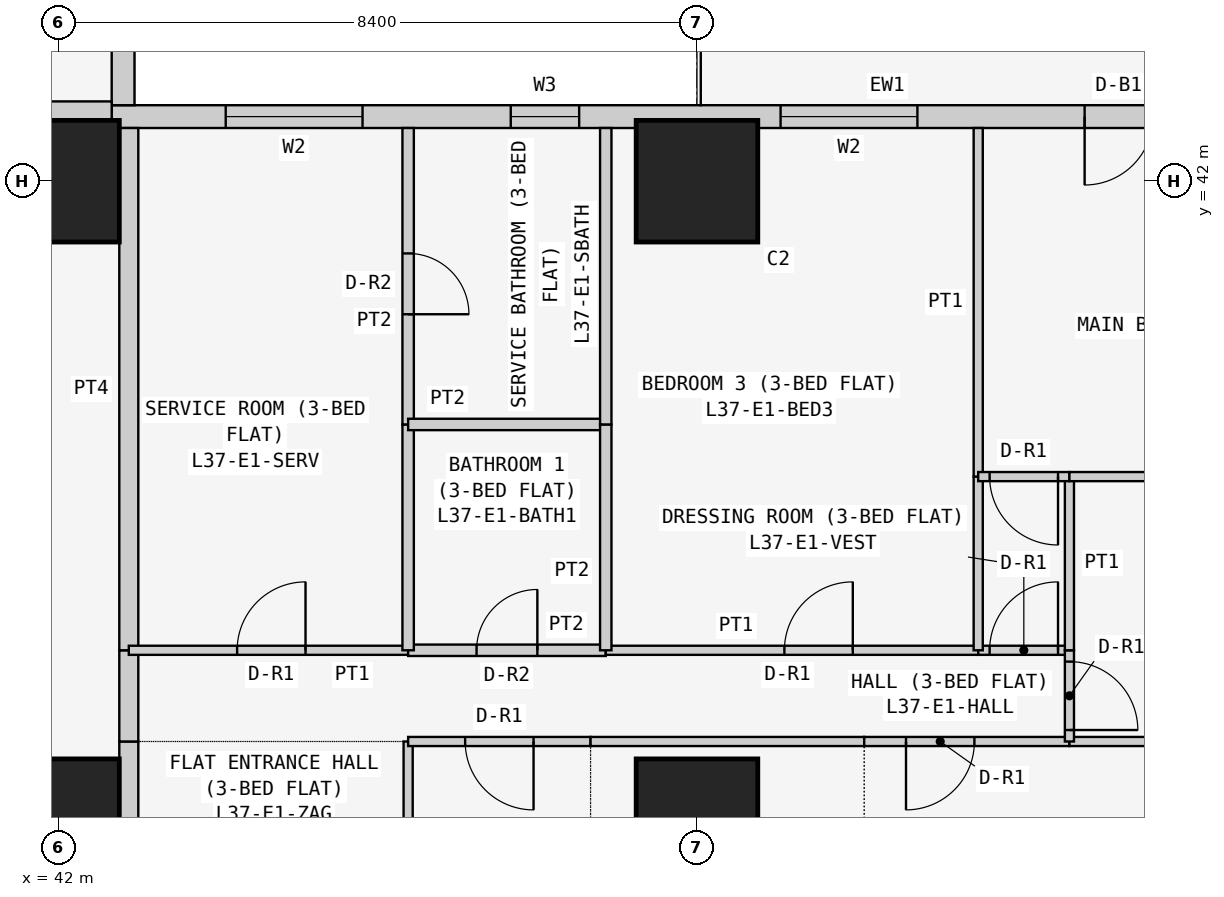
"""IFC4 building model, lengths in metres.
Left out: names, types, materials, properties, quantities, classifications, styles, units other than length and angle.
Written with IfcOpenShell. Run it as: python <this file> out.ifc"""

import sys

from ifc_helpers import new_model, si_unit, direction, frame, frame_2d, origin, origin_2d, place, context, subcontext, project, spatial, rectangle, extrude, element, fill, save


model = new_model("IFC4")
c1 = context("Model", 3, precision=1e-05, world=origin(), true_north=direction((0.0, 1.0)))
c2 = subcontext(c1, "Body", "Model", "MODEL_VIEW")
j1 = project(units=[si_unit("LENGTHUNIT", "METRE"), si_unit("PLANEANGLEUNIT", "RADIAN")], contexts=[c1])
p1 = place(None, origin())
s1 = spatial("IfcSite", under=j1, at=p1, CompositionType="ELEMENT")
p2 = place(p1, origin())
s2 = spatial("IfcBuilding", under=s1, at=p2, CompositionType="ELEMENT")
p3 = place(p2, frame((0.0, 0.0, 144.9)))
s3 = spatial("IfcBuildingStorey", under=s2, at=p3, CompositionType="ELEMENT", Elevation=144.9)
for number, where, z_axis, x_axis in (
    (1, (42.0, 33.6, 0.0), (0.0, 0.0, 1.0), (1.0, 0.0, 0.0)),
    (2, (42.0, 42.0, 0.0), (0.0, 0.0, 1.0), (1.0, 0.0, 0.0)),
    (3, (50.4, 33.6, 0.0), (0.0, 0.0, 1.0), (1.0, 0.0, 0.0)),
    (4, (50.4, 42.0, 0.0), (0.0, 0.0, 1.0), (1.0, 0.0, 0.0)),
):
    element("IfcColumn", number, at=place(p3, frame(where, z_axis=z_axis, x_axis=x_axis)), inside=s3, PredefinedType="COLUMN", context=c2, shape_type="SweptSolid", body=[
        extrude(rectangle(XDim=1.6, YDim=1.6, at=origin_2d()), origin(), (0.0, 0.0, 1.0), 3.6),
    ])
p4 = place(p3, frame((58.4, 42.85, 0.0), z_axis=(0.0, 0.0, 1.0), x_axis=(-1.0, 0.0, 0.0)))
e5 = element("IfcWall", 5, at=p4, inside=s3, PredefinedType="SOLIDWALL", context=c2, shape_type="SweptSolid", body=[
    extrude(rectangle(XDim=15.7, YDim=0.3, at=frame_2d((7.85, 0.0))), origin(), (0.0, 0.0, 1.0), 3.45),
])
p5 = place(p4, frame((12.4, 0.0, 0.9)))
e6 = element("IfcOpeningElement", 6, at=p5, cuts=e5, PredefinedType="OPENING", context=c2, shape_type="SweptSolid", body=[
    extrude(rectangle(XDim=1.8, YDim=1.5, at=frame_2d((0.9, 0.75))), frame((0.0, 0.16, 0.0), z_axis=(0.0, -1.0, 0.0), x_axis=(1.0, 0.0, 0.0)), (0.0, 0.0, 1.0), 0.32),
])
p6 = place(p4, frame((9.55, 0.0, 1.5)))
e7 = element("IfcOpeningElement", 7, at=p6, cuts=e5, PredefinedType="OPENING", context=c2, shape_type="SweptSolid", body=[
    extrude(rectangle(XDim=0.9, YDim=0.7, at=frame_2d((0.45, 0.35))), frame((0.0, 0.16, 0.0), z_axis=(0.0, -1.0, 0.0), x_axis=(1.0, 0.0, 0.0)), (0.0, 0.0, 1.0), 0.32),
])
p7 = place(p4, frame((5.1, 0.0, 0.9)))
e8 = element("IfcOpeningElement", 8, at=p7, cuts=e5, PredefinedType="OPENING", context=c2, shape_type="SweptSolid", body=[
    extrude(rectangle(XDim=1.8, YDim=1.5, at=frame_2d((0.9, 0.75))), frame((0.0, 0.16, 0.0), z_axis=(0.0, -1.0, 0.0), x_axis=(1.0, 0.0, 0.0)), (0.0, 0.0, 1.0), 0.32),
])
p8 = place(p4, frame((2.0, 0.0, 0.0)))
e9 = element("IfcOpeningElement", 9, at=p8, cuts=e5, PredefinedType="OPENING", context=c2, shape_type="SweptSolid", body=[
    extrude(rectangle(XDim=0.9, YDim=2.4, at=frame_2d((0.45, 1.2))), frame((0.0, 0.16, 0.0), z_axis=(0.0, -1.0, 0.0), x_axis=(1.0, 0.0, 0.0)), (0.0, 0.0, 1.0), 0.32),
])
p9 = place(p4, frame((0.7, 0.0, 0.9)))
e10 = element("IfcOpeningElement", 10, at=p9, cuts=e5, PredefinedType="OPENING", context=c2, shape_type="SweptSolid", body=[
    extrude(rectangle(XDim=1.2, YDim=1.5, at=frame_2d((0.6, 0.75))), frame((0.0, 0.16, 0.0), z_axis=(0.0, -1.0, 0.0), x_axis=(1.0, 0.0, 0.0)), (0.0, 0.0, 1.0), 0.32),
])
p10 = place(p3, frame((42.85, 43.0, 0.0), z_axis=(0.0, 0.0, 1.0), x_axis=(0.0, 1.0, 0.0)))
e11 = element("IfcWall", 11, at=p10, inside=s3, PredefinedType="SOLIDWALL", context=c2, shape_type="SweptSolid", body=[
    extrude(rectangle(XDim=7.0, YDim=0.3, at=frame_2d((3.5, 0.0))), origin(), (0.0, 0.0, 1.0), 3.45),
])
p11 = place(p10, frame((1.5, 0.0, 0.9)))
e12 = element("IfcOpeningElement", 12, at=p11, cuts=e11, PredefinedType="OPENING", context=c2, shape_type="SweptSolid", body=[
    extrude(rectangle(XDim=2.4, YDim=1.5, at=frame_2d((1.2, 0.75))), frame((0.0, 0.16, 0.0), z_axis=(0.0, -1.0, 0.0), x_axis=(1.0, 0.0, 0.0)), (0.0, 0.0, 1.0), 0.32),
])
p12 = place(p10, frame((5.05, 0.0, 0.9)))
e13 = element("IfcOpeningElement", 13, at=p12, cuts=e11, PredefinedType="OPENING", context=c2, shape_type="SweptSolid", body=[
    extrude(rectangle(XDim=1.2, YDim=1.5, at=frame_2d((0.6, 0.75))), frame((0.0, 0.16, 0.0), z_axis=(0.0, -1.0, 0.0), x_axis=(1.0, 0.0, 0.0)), (0.0, 0.0, 1.0), 0.32),
])
p13 = place(p3, frame((36.229, 42.925, 0.0), z_axis=(0.0, 0.0, 1.0), x_axis=(1.0, 0.0, 0.0)))
e14 = element("IfcWall", 14, at=p13, inside=s3, PredefinedType="PARTITIONING", context=c2, shape_type="SweptSolid", body=[
    extrude(rectangle(XDim=6.471, YDim=0.25, at=frame_2d((3.235, 0.0))), origin(), (0.0, 0.0, 1.0), 3.45),
])
p14 = place(p3, frame((42.925, 34.629, 0.0), z_axis=(0.0, 0.0, 1.0), x_axis=(0.0, -1.0, 0.0)))
e15 = element("IfcWall", 15, at=p14, inside=s3, PredefinedType="PARTITIONING", context=c2, shape_type="SweptSolid", body=[
    extrude(rectangle(XDim=5.229, YDim=0.25, at=frame_2d((2.615, 0.0))), origin(), (0.0, 0.0, 1.0), 3.45),
])
p15 = place(p14, frame((2.129, 0.0, 0.0)))
e16 = element("IfcOpeningElement", 16, at=p15, cuts=e15, PredefinedType="OPENING", context=c2, shape_type="SweptSolid", body=[
    extrude(rectangle(XDim=1.0, YDim=2.1, at=frame_2d((0.5, 1.05))), frame((0.0, 0.135, 0.0), z_axis=(0.0, -1.0, 0.0), x_axis=(1.0, 0.0, 0.0)), (0.0, 0.0, 1.0), 0.27),
])
p16 = place(p3, frame((42.925, 35.829, 0.0), z_axis=(0.0, 0.0, 1.0), x_axis=(0.0, -1.0, 0.0)))
e17 = element("IfcWall", 17, at=p16, inside=s3, PredefinedType="PARTITIONING", context=c2, shape_type="SweptSolid", body=[
    extrude(rectangle(XDim=1.2, YDim=0.25, at=frame_2d((0.6, 0.0))), origin(), (0.0, 0.0, 1.0), 3.45),
])
p17 = place(p3, frame((42.925, 42.7, 0.0), z_axis=(0.0, 0.0, 1.0), x_axis=(0.0, -1.0, 0.0)))
e18 = element("IfcWall", 18, at=p17, inside=s3, PredefinedType="PARTITIONING", context=c2, shape_type="SweptSolid", body=[
    extrude(rectangle(XDim=6.871, YDim=0.25, at=frame_2d((3.436, 0.0))), origin(), (0.0, 0.0, 1.0), 3.45),
])
p18 = place(p3, frame((46.6, 29.4, 0.0), z_axis=(0.0, 0.0, 1.0), x_axis=(0.0, 1.0, 0.0)))
e19 = element("IfcWall", 19, at=p18, inside=s3, PredefinedType="PARTITIONING", context=c2, shape_type="SweptSolid", body=[
    extrude(rectangle(XDim=5.229, YDim=0.12, at=frame_2d((2.615, 0.0))), origin(), (0.0, 0.0, 1.0), 3.45),
])
p19 = place(p3, frame((49.0, 34.629, 0.0), z_axis=(0.0, 0.0, 1.0), x_axis=(-1.0, 0.0, 0.0)))
e20 = element("IfcWall", 20, at=p19, inside=s3, PredefinedType="PARTITIONING", context=c2, shape_type="SweptSolid", body=[
    extrude(rectangle(XDim=2.4, YDim=0.12, at=frame_2d((1.2, 0.0))), origin(), (0.0, 0.0, 1.0), 3.45),
])
p20 = place(p19, frame((0.75, 0.0, 0.0)))
e21 = element("IfcOpeningElement", 21, at=p20, cuts=e20, PredefinedType="OPENING", context=c2, shape_type="SweptSolid", body=[
    extrude(rectangle(XDim=0.9, YDim=2.1, at=frame_2d((0.45, 1.05))), frame((0.0, 0.07, 0.0), z_axis=(0.0, -1.0, 0.0), x_axis=(1.0, 0.0, 0.0)), (0.0, 0.0, 1.0), 0.14),
])
p21 = place(p3, frame((52.6, 34.629, 0.0), z_axis=(0.0, 0.0, 1.0), x_axis=(-1.0, 0.0, 0.0)))
e22 = element("IfcWall", 22, at=p21, inside=s3, PredefinedType="PARTITIONING", context=c2, shape_type="SweptSolid", body=[
    extrude(rectangle(XDim=3.6, YDim=0.12, at=frame_2d((1.8, 0.0))), origin(), (0.0, 0.0, 1.0), 3.45),
])
p22 = place(p3, frame((55.3, 34.629, 0.0), z_axis=(0.0, 0.0, 1.0), x_axis=(-1.0, 0.0, 0.0)))
e23 = element("IfcWall", 23, at=p22, inside=s3, PredefinedType="PARTITIONING", context=c2, shape_type="SweptSolid", body=[
    extrude(rectangle(XDim=2.7, YDim=0.12, at=frame_2d((1.35, 0.0))), origin(), (0.0, 0.0, 1.0), 3.45),
])
p23 = place(p22, frame((1.25, 0.0, 0.0)))
e24 = element("IfcOpeningElement", 24, at=p23, cuts=e23, PredefinedType="OPENING", context=c2, shape_type="SweptSolid", body=[
    extrude(rectangle(XDim=0.9, YDim=2.1, at=frame_2d((0.45, 1.05))), frame((0.0, 0.07, 0.0), z_axis=(0.0, -1.0, 0.0), x_axis=(1.0, 0.0, 0.0)), (0.0, 0.0, 1.0), 0.14),
])
p24 = place(p3, frame((59.45, 34.629, 0.0), z_axis=(0.0, 0.0, 1.0), x_axis=(-1.0, 0.0, 0.0)))
e25 = element("IfcWall", 25, at=p24, inside=s3, PredefinedType="PARTITIONING", context=c2, shape_type="SweptSolid", body=[
    extrude(rectangle(XDim=4.15, YDim=0.12, at=frame_2d((2.075, 0.0))), origin(), (0.0, 0.0, 1.0), 3.45),
])
p25 = place(p3, frame((46.6, 35.829, 0.0), z_axis=(0.0, 0.0, 1.0), x_axis=(-1.0, 0.0, 0.0)))
e26 = element("IfcWall", 26, at=p25, inside=s3, PredefinedType="PARTITIONING", context=c2, shape_type="SweptSolid", body=[
    extrude(rectangle(XDim=3.675, YDim=0.12, at=frame_2d((1.837, 0.0))), origin(), (0.0, 0.0, 1.0), 3.45),
])
p26 = place(p25, frame((1.35, 0.0, 0.0)))
e27 = element("IfcOpeningElement", 27, at=p26, cuts=e26, PredefinedType="OPENING", context=c2, shape_type="SweptSolid", body=[
    extrude(rectangle(XDim=0.9, YDim=2.1, at=frame_2d((0.45, 1.05))), frame((0.0, 0.07, 0.0), z_axis=(0.0, -1.0, 0.0), x_axis=(1.0, 0.0, 0.0)), (0.0, 0.0, 1.0), 0.14),
])
p27 = place(p3, frame((49.2, 35.829, 0.0), z_axis=(0.0, 0.0, 1.0), x_axis=(-1.0, 0.0, 0.0)))
e28 = element("IfcWall", 28, at=p27, inside=s3, PredefinedType="PARTITIONING", context=c2, shape_type="SweptSolid", body=[
    extrude(rectangle(XDim=2.6, YDim=0.15, at=frame_2d((1.3, 0.0))), origin(), (0.0, 0.0, 1.0), 3.45),
])
p28 = place(p27, frame((0.9, 0.0, 0.0)))
e29 = element("IfcOpeningElement", 29, at=p28, cuts=e28, PredefinedType="OPENING", context=c2, shape_type="SweptSolid", body=[
    extrude(rectangle(XDim=0.8, YDim=2.1, at=frame_2d((0.4, 1.05))), frame((0.0, 0.085, 0.0), z_axis=(0.0, -1.0, 0.0), x_axis=(1.0, 0.0, 0.0)), (0.0, 0.0, 1.0), 0.17),
])
p29 = place(p3, frame((54.1, 35.829, 0.0), z_axis=(0.0, 0.0, 1.0), x_axis=(-1.0, 0.0, 0.0)))
e30 = element("IfcWall", 30, at=p29, inside=s3, PredefinedType="PARTITIONING", context=c2, shape_type="SweptSolid", body=[
    extrude(rectangle(XDim=4.9, YDim=0.12, at=frame_2d((2.45, 0.0))), origin(), (0.0, 0.0, 1.0), 3.45),
])
p30 = place(p29, frame((1.65, 0.0, 0.0)))
e31 = element("IfcOpeningElement", 31, at=p30, cuts=e30, PredefinedType="OPENING", context=c2, shape_type="SweptSolid", body=[
    extrude(rectangle(XDim=0.9, YDim=2.1, at=frame_2d((0.45, 1.05))), frame((0.0, 0.07, 0.0), z_axis=(0.0, -1.0, 0.0), x_axis=(1.0, 0.0, 0.0)), (0.0, 0.0, 1.0), 0.14),
])
p31 = place(p3, frame((55.3, 35.829, 0.0), z_axis=(0.0, 0.0, 1.0), x_axis=(-1.0, 0.0, 0.0)))
e32 = element("IfcWall", 32, at=p31, inside=s3, PredefinedType="PARTITIONING", context=c2, shape_type="SweptSolid", body=[
    extrude(rectangle(XDim=1.2, YDim=0.12, at=frame_2d((0.6, 0.0))), origin(), (0.0, 0.0, 1.0), 3.45),
])
p32 = place(p31, frame((0.15, 0.0, 0.0)))
e33 = element("IfcOpeningElement", 33, at=p32, cuts=e32, PredefinedType="OPENING", context=c2, shape_type="SweptSolid", body=[
    extrude(rectangle(XDim=0.9, YDim=2.1, at=frame_2d((0.45, 1.05))), frame((0.0, 0.07, 0.0), z_axis=(0.0, -1.0, 0.0), x_axis=(1.0, 0.0, 0.0)), (0.0, 0.0, 1.0), 0.14),
])
p33 = place(p3, frame((55.3, 34.629, 0.0), z_axis=(0.0, 0.0, 1.0), x_axis=(0.0, 1.0, 0.0)))
e34 = element("IfcWall", 34, at=p33, inside=s3, PredefinedType="PARTITIONING", context=c2, shape_type="SweptSolid", body=[
    extrude(rectangle(XDim=1.2, YDim=0.12, at=frame_2d((0.6, 0.0))), origin(), (0.0, 0.0, 1.0), 3.45),
])
p34 = place(p33, frame((0.151, 0.0, 0.0)))
e35 = element("IfcOpeningElement", 35, at=p34, cuts=e34, PredefinedType="OPENING", context=c2, shape_type="SweptSolid", body=[
    extrude(rectangle(XDim=0.9, YDim=2.1, at=frame_2d((0.45, 1.05))), frame((0.0, 0.07, 0.0), z_axis=(0.0, -1.0, 0.0), x_axis=(1.0, 0.0, 0.0)), (0.0, 0.0, 1.0), 0.14),
])
p35 = place(p3, frame((46.6, 35.829, 0.0), z_axis=(0.0, 0.0, 1.0), x_axis=(0.0, 1.0, 0.0)))
e36 = element("IfcWall", 36, at=p35, inside=s3, PredefinedType="PARTITIONING", context=c2, shape_type="SweptSolid", body=[
    extrude(rectangle(XDim=2.971, YDim=0.15, at=frame_2d((1.485, 0.0))), origin(), (0.0, 0.0, 1.0), 3.45),
])
p36 = place(p3, frame((46.6, 38.8, 0.0), z_axis=(0.0, 0.0, 1.0), x_axis=(0.0, 1.0, 0.0)))
e37 = element("IfcWall", 37, at=p36, inside=s3, PredefinedType="PARTITIONING", context=c2, shape_type="SweptSolid", body=[
    extrude(rectangle(XDim=3.9, YDim=0.15, at=frame_2d((1.95, 0.0))), origin(), (0.0, 0.0, 1.0), 3.45),
])
p37 = place(p36, frame((1.45, 0.0, 0.0)))
e38 = element("IfcOpeningElement", 38, at=p37, cuts=e37, PredefinedType="OPENING", context=c2, shape_type="SweptSolid", body=[
    extrude(rectangle(XDim=0.8, YDim=2.1, at=frame_2d((0.4, 1.05))), frame((0.0, 0.085, 0.0), z_axis=(0.0, -1.0, 0.0), x_axis=(1.0, 0.0, 0.0)), (0.0, 0.0, 1.0), 0.17),
])
p38 = place(p3, frame((49.2, 38.8, 0.0), z_axis=(0.0, 0.0, 1.0), x_axis=(-1.0, 0.0, 0.0)))
e39 = element("IfcWall", 39, at=p38, inside=s3, PredefinedType="PARTITIONING", context=c2, shape_type="SweptSolid", body=[
    extrude(rectangle(XDim=2.6, YDim=0.15, at=frame_2d((1.3, 0.0))), origin(), (0.0, 0.0, 1.0), 3.45),
])
p39 = place(p3, frame((49.2, 35.829, 0.0), z_axis=(0.0, 0.0, 1.0), x_axis=(0.0, 1.0, 0.0)))
e40 = element("IfcWall", 40, at=p39, inside=s3, PredefinedType="PARTITIONING", context=c2, shape_type="SweptSolid", body=[
    extrude(rectangle(XDim=2.971, YDim=0.15, at=frame_2d((1.485, 0.0))), origin(), (0.0, 0.0, 1.0), 3.45),
])
p40 = place(p3, frame((49.2, 38.8, 0.0), z_axis=(0.0, 0.0, 1.0), x_axis=(0.0, 1.0, 0.0)))
e41 = element("IfcWall", 41, at=p40, inside=s3, PredefinedType="PARTITIONING", context=c2, shape_type="SweptSolid", body=[
    extrude(rectangle(XDim=3.9, YDim=0.15, at=frame_2d((1.95, 0.0))), origin(), (0.0, 0.0, 1.0), 3.45),
])
p41 = place(p3, frame((54.1, 35.829, 0.0), z_axis=(0.0, 0.0, 1.0), x_axis=(0.0, 1.0, 0.0)))
e42 = element("IfcWall", 42, at=p41, inside=s3, PredefinedType="PARTITIONING", context=c2, shape_type="SweptSolid", body=[
    extrude(rectangle(XDim=2.285, YDim=0.12, at=frame_2d((1.143, 0.0))), origin(), (0.0, 0.0, 1.0), 3.45),
])
p42 = place(p3, frame((54.1, 38.114, 0.0), z_axis=(0.0, 0.0, 1.0), x_axis=(0.0, 1.0, 0.0)))
e43 = element("IfcWall", 43, at=p42, inside=s3, PredefinedType="PARTITIONING", context=c2, shape_type="SweptSolid", body=[
    extrude(rectangle(XDim=4.586, YDim=0.12, at=frame_2d((2.293, 0.0))), origin(), (0.0, 0.0, 1.0), 3.45),
])
p43 = place(p3, frame((55.3, 35.829, 0.0), z_axis=(0.0, 0.0, 1.0), x_axis=(0.0, 1.0, 0.0)))
e44 = element("IfcWall", 44, at=p43, inside=s3, PredefinedType="PARTITIONING", context=c2, shape_type="SweptSolid", body=[
    extrude(rectangle(XDim=2.285, YDim=0.12, at=frame_2d((1.143, 0.0))), origin(), (0.0, 0.0, 1.0), 3.45),
])
p44 = place(p3, frame((55.3, 38.114, 0.0), z_axis=(0.0, 0.0, 1.0), x_axis=(-1.0, 0.0, 0.0)))
e45 = element("IfcWall", 45, at=p44, inside=s3, PredefinedType="PARTITIONING", context=c2, shape_type="SweptSolid", body=[
    extrude(rectangle(XDim=1.2, YDim=0.12, at=frame_2d((0.6, 0.0))), origin(), (0.0, 0.0, 1.0), 3.45),
])
p45 = place(p44, frame((0.15, 0.0, 0.0)))
e46 = element("IfcOpeningElement", 46, at=p45, cuts=e45, PredefinedType="OPENING", context=c2, shape_type="SweptSolid", body=[
    extrude(rectangle(XDim=0.9, YDim=2.1, at=frame_2d((0.45, 1.05))), frame((0.0, 0.07, 0.0), z_axis=(0.0, -1.0, 0.0), x_axis=(1.0, 0.0, 0.0)), (0.0, 0.0, 1.0), 0.14),
])
p46 = place(p3, frame((59.45, 38.114, 0.0), z_axis=(0.0, 0.0, 1.0), x_axis=(-1.0, 0.0, 0.0)))
e47 = element("IfcWall", 47, at=p46, inside=s3, PredefinedType="PARTITIONING", context=c2, shape_type="SweptSolid", body=[
    extrude(rectangle(XDim=4.15, YDim=0.12, at=frame_2d((2.075, 0.0))), origin(), (0.0, 0.0, 1.0), 3.45),
])
p47 = place(p5, origin())
e48 = element("IfcWindow", 48, at=p47, inside=s3, PartitioningType="SINGLE_PANEL", PredefinedType="WINDOW", context=c2, shape_type="SweptSolid", body=[
    extrude(rectangle(XDim=1.8, YDim=1.5, at=frame_2d((0.9, 0.75))), frame((0.0, 0.03, 0.0), z_axis=(0.0, -1.0, 0.0), x_axis=(1.0, 0.0, 0.0)), (0.0, 0.0, 1.0), 0.06),
])
fill(e6, e48)
p48 = place(p6, origin())
e49 = element("IfcWindow", 49, at=p48, inside=s3, PartitioningType="SINGLE_PANEL", PredefinedType="WINDOW", context=c2, shape_type="SweptSolid", body=[
    extrude(rectangle(XDim=0.9, YDim=0.7, at=frame_2d((0.45, 0.35))), frame((0.0, 0.03, 0.0), z_axis=(0.0, -1.0, 0.0), x_axis=(1.0, 0.0, 0.0)), (0.0, 0.0, 1.0), 0.06),
])
fill(e7, e49)
p49 = place(p7, origin())
e50 = element("IfcWindow", 50, at=p49, inside=s3, PartitioningType="SINGLE_PANEL", PredefinedType="WINDOW", context=c2, shape_type="SweptSolid", body=[
    extrude(rectangle(XDim=1.8, YDim=1.5, at=frame_2d((0.9, 0.75))), frame((0.0, 0.03, 0.0), z_axis=(0.0, -1.0, 0.0), x_axis=(1.0, 0.0, 0.0)), (0.0, 0.0, 1.0), 0.06),
])
fill(e8, e50)
p50 = place(p8, origin())
e51 = element("IfcDoor", 51, at=p50, inside=s3, OperationType="SINGLE_SWING_RIGHT", PredefinedType="DOOR", context=c2, shape_type="SweptSolid", body=[
    extrude(rectangle(XDim=0.9, YDim=2.4, at=frame_2d((0.45, 1.2))), frame((0.0, 0.025, 0.0), z_axis=(0.0, -1.0, 0.0), x_axis=(1.0, 0.0, 0.0)), (0.0, 0.0, 1.0), 0.05),
])
fill(e9, e51)
p51 = place(p20, origin())
e52 = element("IfcDoor", 52, at=p51, inside=s3, OperationType="SINGLE_SWING_LEFT", PredefinedType="DOOR", context=c2, shape_type="SweptSolid", body=[
    extrude(rectangle(XDim=0.9, YDim=2.1, at=frame_2d((0.45, 1.05))), frame((0.0, 0.025, 0.0), z_axis=(0.0, -1.0, 0.0), x_axis=(1.0, 0.0, 0.0)), (0.0, 0.0, 1.0), 0.05),
])
fill(e21, e52)
p52 = place(p23, origin())
e53 = element("IfcDoor", 53, at=p52, inside=s3, OperationType="SINGLE_SWING_RIGHT", PredefinedType="DOOR", context=c2, shape_type="SweptSolid", body=[
    extrude(rectangle(XDim=0.9, YDim=2.1, at=frame_2d((0.45, 1.05))), frame((0.0, 0.025, 0.0), z_axis=(0.0, -1.0, 0.0), x_axis=(1.0, 0.0, 0.0)), (0.0, 0.0, 1.0), 0.05),
])
fill(e24, e53)
p53 = place(p26, frame((0.9, 0.0, 0.0), z_axis=(0.0, 0.0, 1.0), x_axis=(-1.0, 0.0, 0.0)))
e54 = element("IfcDoor", 54, at=p53, inside=s3, OperationType="SINGLE_SWING_RIGHT", PredefinedType="DOOR", context=c2, shape_type="SweptSolid", body=[
    extrude(rectangle(XDim=0.9, YDim=2.1, at=frame_2d((0.45, 1.05))), frame((0.0, 0.025, 0.0), z_axis=(0.0, -1.0, 0.0), x_axis=(1.0, 0.0, 0.0)), (0.0, 0.0, 1.0), 0.05),
])
fill(e27, e54)
p54 = place(p37, frame((0.8, 0.0, 0.0), z_axis=(0.0, 0.0, 1.0), x_axis=(-1.0, 0.0, 0.0)))
e55 = element("IfcDoor", 55, at=p54, inside=s3, OperationType="SINGLE_SWING_RIGHT", PredefinedType="DOOR", context=c2, shape_type="SweptSolid", body=[
    extrude(rectangle(XDim=0.8, YDim=2.1, at=frame_2d((0.4, 1.05))), frame((0.0, 0.025, 0.0), z_axis=(0.0, -1.0, 0.0), x_axis=(1.0, 0.0, 0.0)), (0.0, 0.0, 1.0), 0.05),
])
fill(e38, e55)
p55 = place(p28, frame((0.8, 0.0, 0.0), z_axis=(0.0, 0.0, 1.0), x_axis=(-1.0, 0.0, 0.0)))
e56 = element("IfcDoor", 56, at=p55, inside=s3, OperationType="SINGLE_SWING_RIGHT", PredefinedType="DOOR", context=c2, shape_type="SweptSolid", body=[
    extrude(rectangle(XDim=0.8, YDim=2.1, at=frame_2d((0.4, 1.05))), frame((0.0, 0.025, 0.0), z_axis=(0.0, -1.0, 0.0), x_axis=(1.0, 0.0, 0.0)), (0.0, 0.0, 1.0), 0.05),
])
fill(e29, e56)
p56 = place(p30, frame((0.9, 0.0, 0.0), z_axis=(0.0, 0.0, 1.0), x_axis=(-1.0, 0.0, 0.0)))
e57 = element("IfcDoor", 57, at=p56, inside=s3, OperationType="SINGLE_SWING_RIGHT", PredefinedType="DOOR", context=c2, shape_type="SweptSolid", body=[
    extrude(rectangle(XDim=0.9, YDim=2.1, at=frame_2d((0.45, 1.05))), frame((0.0, 0.025, 0.0), z_axis=(0.0, -1.0, 0.0), x_axis=(1.0, 0.0, 0.0)), (0.0, 0.0, 1.0), 0.05),
])
fill(e31, e57)
p57 = place(p32, frame((0.9, 0.0, 0.0), z_axis=(0.0, 0.0, 1.0), x_axis=(-1.0, 0.0, 0.0)))
e58 = element("IfcDoor", 58, at=p57, inside=s3, OperationType="SINGLE_SWING_RIGHT", PredefinedType="DOOR", context=c2, shape_type="SweptSolid", body=[
    extrude(rectangle(XDim=0.9, YDim=2.1, at=frame_2d((0.45, 1.05))), frame((0.0, 0.025, 0.0), z_axis=(0.0, -1.0, 0.0), x_axis=(1.0, 0.0, 0.0)), (0.0, 0.0, 1.0), 0.05),
])
fill(e33, e58)
p58 = place(p45, origin())
e59 = element("IfcDoor", 59, at=p58, inside=s3, OperationType="SINGLE_SWING_LEFT", PredefinedType="DOOR", context=c2, shape_type="SweptSolid", body=[
    extrude(rectangle(XDim=0.9, YDim=2.1, at=frame_2d((0.45, 1.05))), frame((0.0, 0.025, 0.0), z_axis=(0.0, -1.0, 0.0), x_axis=(1.0, 0.0, 0.0)), (0.0, 0.0, 1.0), 0.05),
])
fill(e46, e59)
p59 = place(p34, frame((0.9, 0.0, 0.0), z_axis=(0.0, 0.0, 1.0), x_axis=(-1.0, 0.0, 0.0)))
e60 = element("IfcDoor", 60, at=p59, inside=s3, OperationType="SINGLE_SWING_RIGHT", PredefinedType="DOOR", context=c2, shape_type="SweptSolid", body=[
    extrude(rectangle(XDim=0.9, YDim=2.1, at=frame_2d((0.45, 1.05))), frame((0.0, 0.025, 0.0), z_axis=(0.0, -1.0, 0.0), x_axis=(1.0, 0.0, 0.0)), (0.0, 0.0, 1.0), 0.05),
])
fill(e35, e60)
save(model, sys.argv[1])
